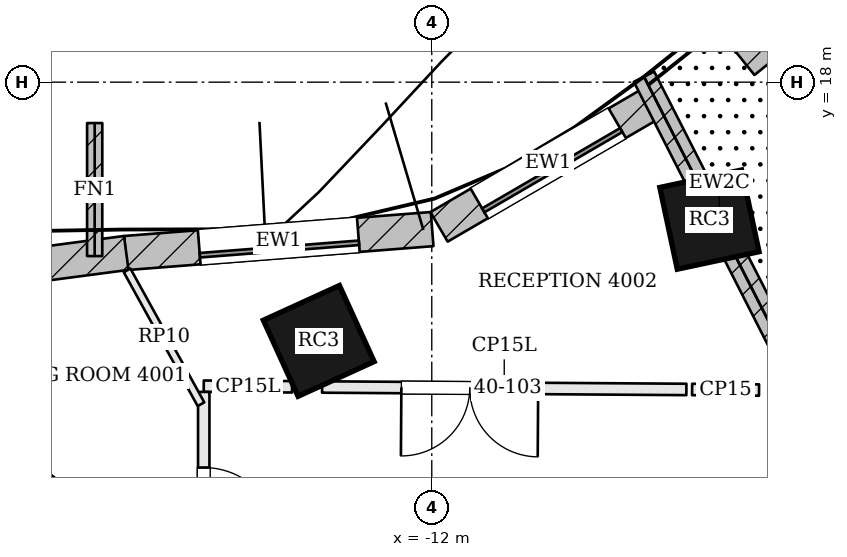
"""IFC4 building model, lengths in metres.
Left out: names, types, materials, properties, quantities, classifications, styles, units other than length and angle.
Written with IfcOpenShell. Run it as: python <this file> out.ifc"""

import sys

from ifc_helpers import new_model, si_unit, direction, frame, frame_2d, origin, origin_2d, place, context, subcontext, project, spatial, rectangle, extrude, element, fill, save


model = new_model("IFC4")
c1 = context("Model", 3, precision=1e-05, world=origin(), true_north=direction((0.0, 1.0)))
c2 = subcontext(c1, "Body", "Model", "MODEL_VIEW")
j1 = project(units=[si_unit("LENGTHUNIT", "METRE"), si_unit("PLANEANGLEUNIT", "RADIAN")], contexts=[c1])
p1 = place(None, origin())
s1 = spatial("IfcSite", under=j1, at=p1, CompositionType="ELEMENT")
p2 = place(p1, origin())
s2 = spatial("IfcBuilding", under=s1, at=p2, CompositionType="ELEMENT")
p3 = place(p2, frame((0.0, 0.0, 165.6)))
s3 = spatial("IfcBuildingStorey", under=s2, at=p3, CompositionType="ELEMENT", Elevation=165.6)
for number, where, z_axis, x_axis in (
    (1, (-8.347, 16.192, 0.0), (0.0, 0.0, 1.0), (-0.978, -0.209, 0.0)),
    (2, (-13.487, 14.596, 0.0), (0.0, 0.0, 1.0), (-0.91, -0.415, 0.0)),
):
    element("IfcColumn", number, at=place(p3, frame(where, z_axis=z_axis, x_axis=x_axis)), inside=s3, PredefinedType="COLUMN", context=c2, shape_type="SweptSolid", body=[
        extrude(rectangle(XDim=1.1, YDim=1.1, at=origin_2d()), origin(), (0.0, 0.0, 1.0), 3.1),
    ])
p4 = place(p3, frame((-9.031, 17.768, 0.0), z_axis=(0.0, 0.0, 1.0), x_axis=(-0.86436168755, -0.502870632565, 0.0)))
e3 = element("IfcWall", 3, at=p4, inside=s3, PredefinedType="SOLIDWALL", context=c2, shape_type="SweptSolid", body=[
    extrude(rectangle(XDim=3.324, YDim=0.45, at=frame_2d((1.662, 0.0))), origin(), (0.0, 0.0, 1.0), 3.6),
])
p5 = place(p4, frame((0.612, 0.0, 0.9)))
e4 = element("IfcOpeningElement", 4, at=p5, cuts=e3, PredefinedType="OPENING", context=c2, shape_type="SweptSolid", body=[
    extrude(rectangle(XDim=2.1, YDim=1.8, at=frame_2d((1.05, 0.9))), frame((0.0, 0.235, 0.0), z_axis=(0.0, -1.0, 0.0), x_axis=(1.0, 0.0, 0.0)), (0.0, 0.0, 1.0), 0.47),
])
p6 = place(p3, frame((-11.995, 16.067, 0.0), z_axis=(0.0, 0.0, 1.0), x_axis=(-0.996967993416, -0.077812724559, 0.0)))
e5 = element("IfcWall", 5, at=p6, inside=s3, PredefinedType="SOLIDWALL", context=c2, shape_type="SweptSolid", body=[
    extrude(rectangle(XDim=4.047, YDim=0.45, at=frame_2d((2.024, 0.0))), origin(), (0.0, 0.0, 1.0), 3.6),
])
p7 = place(p6, frame((0.974, 0.0, 0.9)))
e6 = element("IfcOpeningElement", 6, at=p7, cuts=e5, PredefinedType="OPENING", context=c2, shape_type="SweptSolid", body=[
    extrude(rectangle(XDim=2.1, YDim=1.8, at=frame_2d((1.05, 0.9))), frame((0.0, 0.235, 0.0), z_axis=(0.0, -1.0, 0.0), x_axis=(1.0, 0.0, 0.0)), (0.0, 0.0, 1.0), 0.47),
])
p8 = place(p3, frame((-16.019, 15.753, 0.0), z_axis=(0.0, 0.0, 1.0), x_axis=(-0.991409967396, -0.130790965086, 0.0)))
e7 = element("IfcWall", 7, at=p8, inside=s3, PredefinedType="SOLIDWALL", context=c2, shape_type="SweptSolid", body=[
    extrude(rectangle(XDim=5.068, YDim=0.45, at=frame_2d((2.534, 0.0))), origin(), (0.0, 0.0, 1.0), 3.6),
])
p9 = place(p8, frame((1.484, 0.0, 0.9)))
e8 = element("IfcOpeningElement", 8, at=p9, cuts=e7, PredefinedType="OPENING", context=c2, shape_type="SweptSolid", body=[
    extrude(rectangle(XDim=2.1, YDim=1.8, at=frame_2d((1.05, 0.9))), frame((0.0, 0.235, 0.0), z_axis=(0.0, -1.0, 0.0), x_axis=(1.0, 0.0, 0.0)), (0.0, 0.0, 1.0), 0.47),
])
p10 = place(p3, frame((-16.435, 15.712, 0.0), z_axis=(0.0, 0.0, 1.0), x_axis=(0.000279017846, 0.999999961075, 0.0)))
e9 = element("IfcWall", 9, at=p10, inside=s3, PredefinedType="SOLIDWALL", context=c2, shape_type="SweptSolid", body=[
    extrude(rectangle(XDim=1.75, YDim=0.2, at=frame_2d((0.875, 0.0))), origin(), (0.0, 0.0, 1.0), 3.6),
])
p11 = place(p3, frame((-9.208, 18.072, 0.0), z_axis=(0.0, 0.0, 1.0), x_axis=(0.453883928901, -0.891060816715, 0.0)))
e10 = element("IfcWall", 10, at=p11, inside=s3, PredefinedType="SOLIDWALL", context=c2, shape_type="SweptSolid", body=[
    extrude(rectangle(XDim=4.369, YDim=0.3, at=frame_2d((2.185, 0.0))), origin(), (0.0, 0.0, 1.0), 3.104),
])
p12 = place(p3, frame((-7.144, 18.971, 0.0), z_axis=(0.0, 0.0, 1.0), x_axis=(-0.778844346889, -0.627217253684, 0.0)))
e11 = element("IfcWall", 11, at=p12, inside=s3, PredefinedType="SOLIDWALL", context=c2, shape_type="SweptSolid", body=[
    extrude(rectangle(XDim=1.026, YDim=0.6, at=frame_2d((0.513, 0.0))), origin(), (0.0, 0.0, 1.0), 0.6),
])
p13 = place(p3, frame((-7.695, 13.949, 0.0), z_axis=(0.0, 0.0, 1.0), x_axis=(-0.99996541421, 0.00831687342, 0.0)))
e12 = element("IfcWall", 12, at=p13, inside=s3, PredefinedType="PARTITIONING", context=c2, shape_type="SweptSolid", body=[
    extrude(rectangle(XDim=0.881, YDim=0.15, at=frame_2d((0.44, 0.0))), origin(), (0.0, 0.0, 1.0), 3.098),
])
p14 = place(p3, frame((-8.65, 13.958, 0.0), z_axis=(0.0, 0.0, 1.0), x_axis=(-0.999977735485, 0.006672970473, 0.0)))
e13 = element("IfcWall", 13, at=p14, inside=s3, PredefinedType="PARTITIONING", context=c2, shape_type="SweptSolid", body=[
    extrude(rectangle(XDim=4.793, YDim=0.15, at=frame_2d((2.396, 0.0))), origin(), (0.0, 0.0, 1.0), 2.58),
])
p15 = place(p14, frame((1.95, 0.0, 0.0)))
e14 = element("IfcOpeningElement", 14, at=p15, cuts=e13, PredefinedType="OPENING", context=c2, shape_type="SweptSolid", body=[
    extrude(rectangle(XDim=1.8, YDim=2.1, at=frame_2d((0.9, 1.05))), frame((0.0, 0.085, 0.0), z_axis=(0.0, -1.0, 0.0), x_axis=(1.0, 0.0, 0.0)), (0.0, 0.0, 1.0), 0.17),
])
p16 = place(p3, frame((-13.838, 13.992, 0.0), z_axis=(0.0, 0.0, 1.0), x_axis=(-0.999977403492, 0.006722537166, 0.0)))
e15 = element("IfcWall", 15, at=p16, inside=s3, PredefinedType="PARTITIONING", context=c2, shape_type="SweptSolid", body=[
    extrude(rectangle(XDim=1.162, YDim=0.15, at=frame_2d((0.581, 0.0))), origin(), (0.0, 0.0, 1.0), 2.58),
])
p17 = place(p3, frame((-15.0, 13.925, 0.0), z_axis=(0.0, 0.0, 1.0), x_axis=(0.0, -1.0, 0.0)))
e16 = element("IfcWall", 16, at=p17, inside=s3, PredefinedType="PARTITIONING", context=c2, shape_type="SweptSolid", body=[
    extrude(rectangle(XDim=6.021, YDim=0.15, at=frame_2d((3.01, 0.0))), origin(), (0.0, 0.0, 1.0), 3.098),
])
p18 = place(p17, frame((0.995, 0.0, 0.0)))
e17 = element("IfcOpeningElement", 17, at=p18, cuts=e16, PredefinedType="OPENING", context=c2, shape_type="SweptSolid", body=[
    extrude(rectangle(XDim=1.0, YDim=2.4, at=frame_2d((0.5, 1.2))), frame((0.0, 0.085, 0.0), z_axis=(0.0, -1.0, 0.0), x_axis=(1.0, 0.0, 0.0)), (0.0, 0.0, 1.0), 0.17),
])
p19 = place(p17, frame((3.71, 0.0, 0.0)))
e18 = element("IfcOpeningElement", 18, at=p19, cuts=e16, PredefinedType="OPENING", context=c2, shape_type="SweptSolid", body=[
    extrude(rectangle(XDim=1.0, YDim=2.4, at=frame_2d((0.5, 1.2))), frame((0.0, 0.085, 0.0), z_axis=(0.0, -1.0, 0.0), x_axis=(1.0, 0.0, 0.0)), (0.0, 0.0, 1.0), 0.17),
])
p20 = place(p3, frame((-15.036, 13.763, 0.0), z_axis=(0.0, 0.0, 1.0), x_axis=(-0.483404650684, 0.875397020613, 0.0)))
e19 = element("IfcWall", 19, at=p20, inside=s3, PredefinedType="PARTITIONING", context=c2, shape_type="SweptSolid", body=[
    extrude(rectangle(XDim=2.011, YDim=0.1, at=frame_2d((1.005, 0.0))), origin(), (0.0, 0.0, 1.0), 3.084),
])
p21 = place(p3, frame((-15.052, 11.216, 0.0), z_axis=(0.0, 0.0, 1.0), x_axis=(-0.782929703911, 0.622110182149, 0.0)))
e20 = element("IfcWall", 20, at=p21, inside=s3, PredefinedType="PARTITIONING", context=c2, shape_type="SweptSolid", body=[
    extrude(rectangle(XDim=6.043, YDim=0.1, at=frame_2d((3.022, 0.0))), origin(), (0.0, 0.0, 1.0), 3.084),
])
p22 = place(p5, origin())
e21 = element("IfcWindow", 21, at=p22, inside=s3, PartitioningType="SINGLE_PANEL", PredefinedType="WINDOW", context=c2, shape_type="SweptSolid", body=[
    extrude(rectangle(XDim=2.1, YDim=1.8, at=frame_2d((1.05, 0.9))), frame((0.0, 0.135, 0.0), z_axis=(0.0, -1.0, 0.0), x_axis=(1.0, 0.0, 0.0)), (0.0, 0.0, 1.0), 0.06),
])
fill(e4, e21)
p23 = place(p7, origin())
e22 = element("IfcWindow", 22, at=p23, inside=s3, PartitioningType="SINGLE_PANEL", PredefinedType="WINDOW", context=c2, shape_type="SweptSolid", body=[
    extrude(rectangle(XDim=2.1, YDim=1.8, at=frame_2d((1.05, 0.9))), frame((0.0, 0.135, 0.0), z_axis=(0.0, -1.0, 0.0), x_axis=(1.0, 0.0, 0.0)), (0.0, 0.0, 1.0), 0.06),
])
fill(e6, e22)
p24 = place(p15, origin())
e23 = element("IfcDoor", 23, at=p24, inside=s3, OperationType="DOUBLE_DOOR_SINGLE_SWING", PredefinedType="DOOR", context=c2, shape_type="SweptSolid", body=[
    extrude(rectangle(XDim=1.8, YDim=2.1, at=frame_2d((0.9, 1.05))), frame((0.0, 0.025, 0.0), z_axis=(0.0, -1.0, 0.0), x_axis=(1.0, 0.0, 0.0)), (0.0, 0.0, 1.0), 0.05),
])
fill(e14, e23)
p25 = place(p18, origin())
e24 = element("IfcDoor", 24, at=p25, inside=s3, OperationType="SINGLE_SWING_RIGHT", PredefinedType="DOOR", context=c2, shape_type="SweptSolid", body=[
    extrude(rectangle(XDim=1.0, YDim=2.4, at=frame_2d((0.5, 1.2))), frame((0.0, 0.025, 0.0), z_axis=(0.0, -1.0, 0.0), x_axis=(1.0, 0.0, 0.0)), (0.0, 0.0, 1.0), 0.05),
])
fill(e17, e24)
save(model, sys.argv[1])
